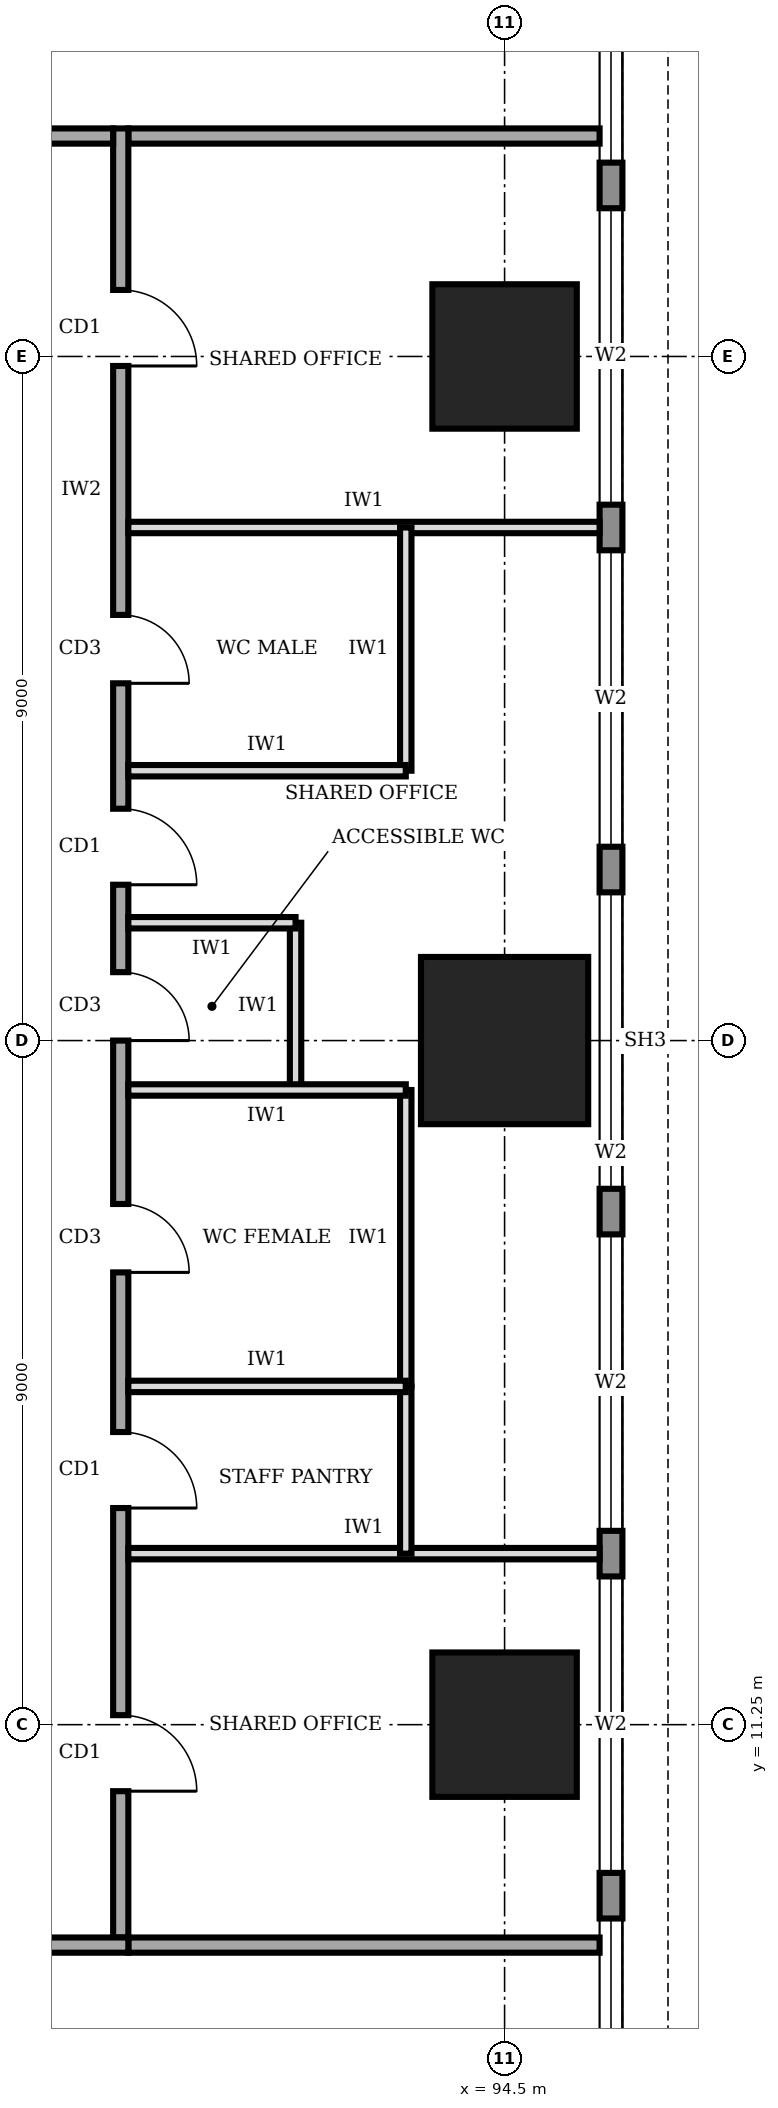
"""IFC4 building model, lengths in metres.
Left out: names, types, materials, properties, quantities, classifications, styles, units other than length and angle.
Written with IfcOpenShell. Run it as: python <this file> out.ifc"""

import sys

from ifc_helpers import new_model, si_unit, direction, frame, frame_2d, origin, origin_2d, place, context, subcontext, project, spatial, rectangle, extrude, element, fill, save


model = new_model("IFC4")
c1 = context("Model", 3, precision=1e-05, world=origin(), true_north=direction((0.0, 1.0)))
c2 = subcontext(c1, "Body", "Model", "MODEL_VIEW")
j1 = project(units=[si_unit("LENGTHUNIT", "METRE"), si_unit("PLANEANGLEUNIT", "RADIAN")], contexts=[c1])
p1 = place(None, origin())
s1 = spatial("IfcSite", under=j1, at=p1, CompositionType="ELEMENT")
p2 = place(p1, origin())
s2 = spatial("IfcBuilding", under=s1, at=p2, CompositionType="ELEMENT")
p3 = place(p2, frame((0.0, 0.0, 149.0)))
s3 = spatial("IfcBuildingStorey", under=s2, at=p3, CompositionType="ELEMENT", Elevation=149.0)
p4 = place(p3, frame((94.5, 11.25, 0.0), z_axis=(0.0, 0.0, 1.0), x_axis=(1.0, 0.0, 0.0)))
e1 = element("IfcColumn", 1, at=p4, inside=s3, PredefinedType="COLUMN", context=c2, shape_type="SweptSolid", body=[
    extrude(rectangle(XDim=1.9, YDim=1.9, at=origin_2d()), origin(), (0.0, 0.0, 1.0), 4.0),
])
p5 = place(p3, frame((94.5, 20.25, 0.0), z_axis=(0.0, 0.0, 1.0), x_axis=(1.0, 0.0, 0.0)))
e2 = element("IfcColumn", 2, at=p5, inside=s3, PredefinedType="COLUMN", context=c2, shape_type="SweptSolid", body=[
    extrude(rectangle(XDim=2.2, YDim=2.2, at=origin_2d()), origin(), (0.0, 0.0, 1.0), 4.0),
])
p6 = place(p3, frame((94.5, 29.25, 0.0), z_axis=(0.0, 0.0, 1.0), x_axis=(1.0, 0.0, 0.0)))
e3 = element("IfcColumn", 3, at=p6, inside=s3, PredefinedType="COLUMN", context=c2, shape_type="SweptSolid", body=[
    extrude(rectangle(XDim=1.9, YDim=1.9, at=origin_2d()), origin(), (0.0, 0.0, 1.0), 4.0),
])
p7 = place(p3, frame((95.9, 3.32, 0.0), z_axis=(0.0, 0.0, 1.0), x_axis=(0.0, 1.0, 0.0)))
e4 = element("IfcWall", 4, at=p7, inside=s3, PredefinedType="STANDARD", context=c2, shape_type="SweptSolid", body=[
    extrude(rectangle(XDim=33.86, YDim=0.3, at=frame_2d((16.93, 0.0))), origin(), (0.0, 0.0, 1.0), 3.75),
])
p8 = place(p7, frame((1.48, 0.0, 0.6)))
e5 = element("IfcOpeningElement", 5, at=p8, cuts=e4, PredefinedType="OPENING", context=c2, shape_type="SweptSolid", body=[
    extrude(rectangle(XDim=3.9, YDim=2.6, at=frame_2d((1.95, 1.3))), frame((0.0, 0.16, 0.0), z_axis=(0.0, -1.0, 0.0), x_axis=(1.0, 0.0, 0.0)), (0.0, 0.0, 1.0), 0.32),
])
p9 = place(p7, frame((5.98, 0.0, 0.6)))
e6 = element("IfcOpeningElement", 6, at=p9, cuts=e4, PredefinedType="OPENING", context=c2, shape_type="SweptSolid", body=[
    extrude(rectangle(XDim=3.9, YDim=2.6, at=frame_2d((1.95, 1.3))), frame((0.0, 0.16, 0.0), z_axis=(0.0, -1.0, 0.0), x_axis=(1.0, 0.0, 0.0)), (0.0, 0.0, 1.0), 0.32),
])
p10 = place(p7, frame((10.48, 0.0, 0.6)))
e7 = element("IfcOpeningElement", 7, at=p10, cuts=e4, PredefinedType="OPENING", context=c2, shape_type="SweptSolid", body=[
    extrude(rectangle(XDim=3.9, YDim=2.6, at=frame_2d((1.95, 1.3))), frame((0.0, 0.16, 0.0), z_axis=(0.0, -1.0, 0.0), x_axis=(1.0, 0.0, 0.0)), (0.0, 0.0, 1.0), 0.32),
])
p11 = place(p7, frame((14.98, 0.0, 0.6)))
e8 = element("IfcOpeningElement", 8, at=p11, cuts=e4, PredefinedType="OPENING", context=c2, shape_type="SweptSolid", body=[
    extrude(rectangle(XDim=3.9, YDim=2.6, at=frame_2d((1.95, 1.3))), frame((0.0, 0.16, 0.0), z_axis=(0.0, -1.0, 0.0), x_axis=(1.0, 0.0, 0.0)), (0.0, 0.0, 1.0), 0.32),
])
p12 = place(p7, frame((19.48, 0.0, 0.6)))
e9 = element("IfcOpeningElement", 9, at=p12, cuts=e4, PredefinedType="OPENING", context=c2, shape_type="SweptSolid", body=[
    extrude(rectangle(XDim=3.9, YDim=2.6, at=frame_2d((1.95, 1.3))), frame((0.0, 0.16, 0.0), z_axis=(0.0, -1.0, 0.0), x_axis=(1.0, 0.0, 0.0)), (0.0, 0.0, 1.0), 0.32),
])
p13 = place(p7, frame((23.98, 0.0, 0.6)))
e10 = element("IfcOpeningElement", 10, at=p13, cuts=e4, PredefinedType="OPENING", context=c2, shape_type="SweptSolid", body=[
    extrude(rectangle(XDim=3.9, YDim=2.6, at=frame_2d((1.95, 1.3))), frame((0.0, 0.16, 0.0), z_axis=(0.0, -1.0, 0.0), x_axis=(1.0, 0.0, 0.0)), (0.0, 0.0, 1.0), 0.32),
])
p14 = place(p7, frame((28.48, 0.0, 0.6)))
e11 = element("IfcOpeningElement", 11, at=p14, cuts=e4, PredefinedType="OPENING", context=c2, shape_type="SweptSolid", body=[
    extrude(rectangle(XDim=3.9, YDim=2.6, at=frame_2d((1.95, 1.3))), frame((0.0, 0.16, 0.0), z_axis=(0.0, -1.0, 0.0), x_axis=(1.0, 0.0, 0.0)), (0.0, 0.0, 1.0), 0.32),
])
p15 = place(p3, frame((63.3, 8.35, 0.0), z_axis=(0.0, 0.0, 1.0), x_axis=(1.0, 0.0, 0.0)))
e12 = element("IfcWall", 12, at=p15, inside=s3, PredefinedType="SOLIDWALL", context=c2, shape_type="SweptSolid", body=[
    extrude(rectangle(XDim=26.25, YDim=0.2, at=frame_2d((13.125, 0.0))), origin(), (0.0, 0.0, 1.0), 3.75),
])
p16 = place(p15, frame((6.0, 0.0, 0.0)))
e13 = element("IfcOpeningElement", 13, at=p16, cuts=e12, PredefinedType="OPENING", context=c2, shape_type="SweptSolid", body=[
    extrude(rectangle(XDim=1.0, YDim=2.1, at=frame_2d((0.5, 1.05))), frame((0.0, 0.11, 0.0), z_axis=(0.0, -1.0, 0.0), x_axis=(1.0, 0.0, 0.0)), (0.0, 0.0, 1.0), 0.22),
])
p17 = place(p15, frame((19.325, 0.0, 0.0)))
e14 = element("IfcOpeningElement", 14, at=p17, cuts=e12, PredefinedType="OPENING", context=c2, shape_type="SweptSolid", body=[
    extrude(rectangle(XDim=1.0, YDim=2.1, at=frame_2d((0.5, 1.05))), frame((0.0, 0.11, 0.0), z_axis=(0.0, -1.0, 0.0), x_axis=(1.0, 0.0, 0.0)), (0.0, 0.0, 1.0), 0.22),
])
p18 = place(p3, frame((89.45, 8.45, 0.0), z_axis=(0.0, 0.0, 1.0), x_axis=(0.0, 1.0, 0.0)))
e15 = element("IfcWall", 15, at=p18, inside=s3, PredefinedType="SOLIDWALL", context=c2, shape_type="SweptSolid", body=[
    extrude(rectangle(XDim=23.8, YDim=0.2, at=frame_2d((11.9, 0.0))), origin(), (0.0, 0.0, 1.0), 3.75),
])
p19 = place(p18, frame((1.925, 0.0, 0.0)))
e16 = element("IfcOpeningElement", 16, at=p19, cuts=e15, PredefinedType="OPENING", context=c2, shape_type="SweptSolid", body=[
    extrude(rectangle(XDim=1.0, YDim=2.1, at=frame_2d((0.5, 1.05))), frame((0.0, 0.11, 0.0), z_axis=(0.0, -1.0, 0.0), x_axis=(1.0, 0.0, 0.0)), (0.0, 0.0, 1.0), 0.22),
])
p20 = place(p18, frame((5.65, 0.0, 0.0)))
e17 = element("IfcOpeningElement", 17, at=p20, cuts=e15, PredefinedType="OPENING", context=c2, shape_type="SweptSolid", body=[
    extrude(rectangle(XDim=1.0, YDim=2.1, at=frame_2d((0.5, 1.05))), frame((0.0, 0.11, 0.0), z_axis=(0.0, -1.0, 0.0), x_axis=(1.0, 0.0, 0.0)), (0.0, 0.0, 1.0), 0.22),
])
p21 = place(p18, frame((8.75, 0.0, 0.0)))
e18 = element("IfcOpeningElement", 18, at=p21, cuts=e15, PredefinedType="OPENING", context=c2, shape_type="SweptSolid", body=[
    extrude(rectangle(XDim=0.9, YDim=2.1, at=frame_2d((0.45, 1.05))), frame((0.0, 0.11, 0.0), z_axis=(0.0, -1.0, 0.0), x_axis=(1.0, 0.0, 0.0)), (0.0, 0.0, 1.0), 0.22),
])
p22 = place(p18, frame((11.8, 0.0, 0.0)))
e19 = element("IfcOpeningElement", 19, at=p22, cuts=e15, PredefinedType="OPENING", context=c2, shape_type="SweptSolid", body=[
    extrude(rectangle(XDim=0.9, YDim=2.1, at=frame_2d((0.45, 1.05))), frame((0.0, 0.11, 0.0), z_axis=(0.0, -1.0, 0.0), x_axis=(1.0, 0.0, 0.0)), (0.0, 0.0, 1.0), 0.22),
])
p23 = place(p18, frame((16.5, 0.0, 0.0)))
e20 = element("IfcOpeningElement", 20, at=p23, cuts=e15, PredefinedType="OPENING", context=c2, shape_type="SweptSolid", body=[
    extrude(rectangle(XDim=0.9, YDim=2.1, at=frame_2d((0.45, 1.05))), frame((0.0, 0.11, 0.0), z_axis=(0.0, -1.0, 0.0), x_axis=(1.0, 0.0, 0.0)), (0.0, 0.0, 1.0), 0.22),
])
p24 = place(p18, frame((13.85, 0.0, 0.0)))
e21 = element("IfcOpeningElement", 21, at=p24, cuts=e15, PredefinedType="OPENING", context=c2, shape_type="SweptSolid", body=[
    extrude(rectangle(XDim=1.0, YDim=2.1, at=frame_2d((0.5, 1.05))), frame((0.0, 0.11, 0.0), z_axis=(0.0, -1.0, 0.0), x_axis=(1.0, 0.0, 0.0)), (0.0, 0.0, 1.0), 0.22),
])
p25 = place(p18, frame((20.675, 0.0, 0.0)))
e22 = element("IfcOpeningElement", 22, at=p25, cuts=e15, PredefinedType="OPENING", context=c2, shape_type="SweptSolid", body=[
    extrude(rectangle(XDim=1.0, YDim=2.1, at=frame_2d((0.5, 1.05))), frame((0.0, 0.11, 0.0), z_axis=(0.0, -1.0, 0.0), x_axis=(1.0, 0.0, 0.0)), (0.0, 0.0, 1.0), 0.22),
])
p26 = place(p3, frame((89.35, 32.15, 0.0), z_axis=(0.0, 0.0, 1.0), x_axis=(-1.0, 0.0, 0.0)))
e23 = element("IfcWall", 23, at=p26, inside=s3, PredefinedType="SOLIDWALL", context=c2, shape_type="SweptSolid", body=[
    extrude(rectangle(XDim=26.05, YDim=0.2, at=frame_2d((13.025, 0.0))), origin(), (0.0, 0.0, 1.0), 3.75),
])
p27 = place(p26, frame((16.4, 0.0, 0.0)))
e24 = element("IfcOpeningElement", 24, at=p27, cuts=e23, PredefinedType="OPENING", context=c2, shape_type="SweptSolid", body=[
    extrude(rectangle(XDim=1.8, YDim=2.1, at=frame_2d((0.9, 1.05))), frame((0.0, 0.11, 0.0), z_axis=(0.0, -1.0, 0.0), x_axis=(1.0, 0.0, 0.0)), (0.0, 0.0, 1.0), 0.22),
])
p28 = place(p26, frame((5.6, 0.0, 0.0)))
e25 = element("IfcOpeningElement", 25, at=p28, cuts=e23, PredefinedType="OPENING", context=c2, shape_type="SweptSolid", body=[
    extrude(rectangle(XDim=1.0, YDim=2.1, at=frame_2d((0.5, 1.05))), frame((0.0, 0.11, 0.0), z_axis=(0.0, -1.0, 0.0), x_axis=(1.0, 0.0, 0.0)), (0.0, 0.0, 1.0), 0.22),
])
p29 = place(p26, frame((1.325, 0.0, 0.0)))
e26 = element("IfcOpeningElement", 26, at=p29, cuts=e23, PredefinedType="OPENING", context=c2, shape_type="SweptSolid", body=[
    extrude(rectangle(XDim=1.0, YDim=2.1, at=frame_2d((0.5, 1.05))), frame((0.0, 0.11, 0.0), z_axis=(0.0, -1.0, 0.0), x_axis=(1.0, 0.0, 0.0)), (0.0, 0.0, 1.0), 0.22),
])
for number, where, z_axis, x_axis in (
    (27, (89.55, 8.35, 0.0), (0.0, 0.0, 1.0), (1.0, 0.0, 0.0)),
    (28, (89.55, 32.15, 0.0), (0.0, 0.0, 1.0), (1.0, 0.0, 0.0)),
):
    element("IfcWall", number, at=place(p3, frame(where, z_axis=z_axis, x_axis=x_axis)), inside=s3, PredefinedType="SOLIDWALL", context=c2, shape_type="SweptSolid", body=[
        extrude(rectangle(XDim=6.2, YDim=0.2, at=frame_2d((3.1, 0.0))), origin(), (0.0, 0.0, 1.0), 3.75),
    ])
for number, where, z_axis, x_axis in (
    (29, (89.55, 13.5, 0.0), (0.0, 0.0, 1.0), (1.0, 0.0, 0.0)),
    (30, (89.55, 27.0, 0.0), (0.0, 0.0, 1.0), (1.0, 0.0, 0.0)),
):
    element("IfcWall", number, at=place(p3, frame(where, z_axis=z_axis, x_axis=x_axis)), inside=s3, PredefinedType="PARTITIONING", context=c2, shape_type="SweptSolid", body=[
        extrude(rectangle(XDim=6.2, YDim=0.15, at=frame_2d((3.1, 0.0))), origin(), (0.0, 0.0, 1.0), 3.75),
    ])
p30 = place(p3, frame((89.55, 15.7, 0.0), z_axis=(0.0, 0.0, 1.0), x_axis=(1.0, 0.0, 0.0)))
e31 = element("IfcWall", 31, at=p30, inside=s3, PredefinedType="PARTITIONING", context=c2, shape_type="SweptSolid", body=[
    extrude(rectangle(XDim=3.65, YDim=0.15, at=frame_2d((1.825, 0.0))), origin(), (0.0, 0.0, 1.0), 3.75),
])
p31 = place(p3, frame((89.55, 19.6, 0.0), z_axis=(0.0, 0.0, 1.0), x_axis=(1.0, 0.0, 0.0)))
e32 = element("IfcWall", 32, at=p31, inside=s3, PredefinedType="PARTITIONING", context=c2, shape_type="SweptSolid", body=[
    extrude(rectangle(XDim=3.65, YDim=0.15, at=frame_2d((1.825, 0.0))), origin(), (0.0, 0.0, 1.0), 2.85),
])
p32 = place(p3, frame((89.55, 21.8, 0.0), z_axis=(0.0, 0.0, 1.0), x_axis=(1.0, 0.0, 0.0)))
e33 = element("IfcWall", 33, at=p32, inside=s3, PredefinedType="PARTITIONING", context=c2, shape_type="SweptSolid", body=[
    extrude(rectangle(XDim=2.2, YDim=0.15, at=frame_2d((1.1, 0.0))), origin(), (0.0, 0.0, 1.0), 3.75),
])
p33 = place(p3, frame((89.55, 23.8, 0.0), z_axis=(0.0, 0.0, 1.0), x_axis=(1.0, 0.0, 0.0)))
e34 = element("IfcWall", 34, at=p33, inside=s3, PredefinedType="PARTITIONING", context=c2, shape_type="SweptSolid", body=[
    extrude(rectangle(XDim=3.65, YDim=0.15, at=frame_2d((1.825, 0.0))), origin(), (0.0, 0.0, 1.0), 3.75),
])
p34 = place(p3, frame((93.2, 13.5, 0.0), z_axis=(0.0, 0.0, 1.0), x_axis=(0.0, 1.0, 0.0)))
e35 = element("IfcWall", 35, at=p34, inside=s3, PredefinedType="PARTITIONING", context=c2, shape_type="SweptSolid", body=[
    extrude(rectangle(XDim=2.2, YDim=0.15, at=frame_2d((1.1, 0.0))), origin(), (0.0, 0.0, 1.0), 3.75),
])
p35 = place(p3, frame((93.2, 15.7, 0.0), z_axis=(0.0, 0.0, 1.0), x_axis=(0.0, 1.0, 0.0)))
e36 = element("IfcWall", 36, at=p35, inside=s3, PredefinedType="PARTITIONING", context=c2, shape_type="SweptSolid", body=[
    extrude(rectangle(XDim=3.9, YDim=0.15, at=frame_2d((1.95, 0.0))), origin(), (0.0, 0.0, 1.0), 3.75),
])
p36 = place(p3, frame((91.75, 19.6, 0.0), z_axis=(0.0, 0.0, 1.0), x_axis=(0.0, 1.0, 0.0)))
e37 = element("IfcWall", 37, at=p36, inside=s3, PredefinedType="PARTITIONING", context=c2, shape_type="SweptSolid", body=[
    extrude(rectangle(XDim=2.2, YDim=0.15, at=frame_2d((1.1, 0.0))), origin(), (0.0, 0.0, 1.0), 3.75),
])
p37 = place(p3, frame((93.2, 23.8, 0.0), z_axis=(0.0, 0.0, 1.0), x_axis=(0.0, 1.0, 0.0)))
e38 = element("IfcWall", 38, at=p37, inside=s3, PredefinedType="PARTITIONING", context=c2, shape_type="SweptSolid", body=[
    extrude(rectangle(XDim=3.2, YDim=0.15, at=frame_2d((1.6, 0.0))), origin(), (0.0, 0.0, 1.0), 3.75),
])
p38 = place(p8, origin())
e39 = element("IfcWindow", 39, at=p38, inside=s3, PartitioningType="SINGLE_PANEL", PredefinedType="WINDOW", context=c2, shape_type="SweptSolid", body=[
    extrude(rectangle(XDim=3.9, YDim=2.6, at=frame_2d((1.95, 1.3))), frame((0.0, 0.03, 0.0), z_axis=(0.0, -1.0, 0.0), x_axis=(1.0, 0.0, 0.0)), (0.0, 0.0, 1.0), 0.06),
])
fill(e5, e39)
p39 = place(p9, origin())
e40 = element("IfcWindow", 40, at=p39, inside=s3, PartitioningType="SINGLE_PANEL", PredefinedType="WINDOW", context=c2, shape_type="SweptSolid", body=[
    extrude(rectangle(XDim=3.9, YDim=2.6, at=frame_2d((1.95, 1.3))), frame((0.0, 0.03, 0.0), z_axis=(0.0, -1.0, 0.0), x_axis=(1.0, 0.0, 0.0)), (0.0, 0.0, 1.0), 0.06),
])
fill(e6, e40)
p40 = place(p10, origin())
e41 = element("IfcWindow", 41, at=p40, inside=s3, PartitioningType="SINGLE_PANEL", PredefinedType="WINDOW", context=c2, shape_type="SweptSolid", body=[
    extrude(rectangle(XDim=3.9, YDim=2.6, at=frame_2d((1.95, 1.3))), frame((0.0, 0.03, 0.0), z_axis=(0.0, -1.0, 0.0), x_axis=(1.0, 0.0, 0.0)), (0.0, 0.0, 1.0), 0.06),
])
fill(e7, e41)
p41 = place(p11, origin())
e42 = element("IfcWindow", 42, at=p41, inside=s3, PartitioningType="SINGLE_PANEL", PredefinedType="WINDOW", context=c2, shape_type="SweptSolid", body=[
    extrude(rectangle(XDim=3.9, YDim=2.6, at=frame_2d((1.95, 1.3))), frame((0.0, 0.03, 0.0), z_axis=(0.0, -1.0, 0.0), x_axis=(1.0, 0.0, 0.0)), (0.0, 0.0, 1.0), 0.06),
])
fill(e8, e42)
p42 = place(p12, origin())
e43 = element("IfcWindow", 43, at=p42, inside=s3, PartitioningType="SINGLE_PANEL", PredefinedType="WINDOW", context=c2, shape_type="SweptSolid", body=[
    extrude(rectangle(XDim=3.9, YDim=2.6, at=frame_2d((1.95, 1.3))), frame((0.0, 0.03, 0.0), z_axis=(0.0, -1.0, 0.0), x_axis=(1.0, 0.0, 0.0)), (0.0, 0.0, 1.0), 0.06),
])
fill(e9, e43)
p43 = place(p13, origin())
e44 = element("IfcWindow", 44, at=p43, inside=s3, PartitioningType="SINGLE_PANEL", PredefinedType="WINDOW", context=c2, shape_type="SweptSolid", body=[
    extrude(rectangle(XDim=3.9, YDim=2.6, at=frame_2d((1.95, 1.3))), frame((0.0, 0.03, 0.0), z_axis=(0.0, -1.0, 0.0), x_axis=(1.0, 0.0, 0.0)), (0.0, 0.0, 1.0), 0.06),
])
fill(e10, e44)
p44 = place(p14, origin())
e45 = element("IfcWindow", 45, at=p44, inside=s3, PartitioningType="SINGLE_PANEL", PredefinedType="WINDOW", context=c2, shape_type="SweptSolid", body=[
    extrude(rectangle(XDim=3.9, YDim=2.6, at=frame_2d((1.95, 1.3))), frame((0.0, 0.03, 0.0), z_axis=(0.0, -1.0, 0.0), x_axis=(1.0, 0.0, 0.0)), (0.0, 0.0, 1.0), 0.06),
])
fill(e11, e45)
p45 = place(p19, frame((1.0, 0.0, 0.0), z_axis=(0.0, 0.0, 1.0), x_axis=(-1.0, 0.0, 0.0)))
e46 = element("IfcDoor", 46, at=p45, inside=s3, OperationType="SINGLE_SWING_RIGHT", PredefinedType="DOOR", context=c2, shape_type="SweptSolid", body=[
    extrude(rectangle(XDim=1.0, YDim=2.1, at=frame_2d((0.5, 1.05))), frame((0.0, 0.025, 0.0), z_axis=(0.0, -1.0, 0.0), x_axis=(1.0, 0.0, 0.0)), (0.0, 0.0, 1.0), 0.05),
])
fill(e16, e46)
p46 = place(p20, frame((1.0, 0.0, 0.0), z_axis=(0.0, 0.0, 1.0), x_axis=(-1.0, 0.0, 0.0)))
e47 = element("IfcDoor", 47, at=p46, inside=s3, OperationType="SINGLE_SWING_RIGHT", PredefinedType="DOOR", context=c2, shape_type="SweptSolid", body=[
    extrude(rectangle(XDim=1.0, YDim=2.1, at=frame_2d((0.5, 1.05))), frame((0.0, 0.025, 0.0), z_axis=(0.0, -1.0, 0.0), x_axis=(1.0, 0.0, 0.0)), (0.0, 0.0, 1.0), 0.05),
])
fill(e17, e47)
p47 = place(p21, frame((0.9, 0.0, 0.0), z_axis=(0.0, 0.0, 1.0), x_axis=(-1.0, 0.0, 0.0)))
e48 = element("IfcDoor", 48, at=p47, inside=s3, OperationType="SINGLE_SWING_RIGHT", PredefinedType="DOOR", context=c2, shape_type="SweptSolid", body=[
    extrude(rectangle(XDim=0.9, YDim=2.1, at=frame_2d((0.45, 1.05))), frame((0.0, 0.025, 0.0), z_axis=(0.0, -1.0, 0.0), x_axis=(1.0, 0.0, 0.0)), (0.0, 0.0, 1.0), 0.05),
])
fill(e18, e48)
p48 = place(p22, frame((0.9, 0.0, 0.0), z_axis=(0.0, 0.0, 1.0), x_axis=(-1.0, 0.0, 0.0)))
e49 = element("IfcDoor", 49, at=p48, inside=s3, OperationType="SINGLE_SWING_RIGHT", PredefinedType="DOOR", context=c2, shape_type="SweptSolid", body=[
    extrude(rectangle(XDim=0.9, YDim=2.1, at=frame_2d((0.45, 1.05))), frame((0.0, 0.025, 0.0), z_axis=(0.0, -1.0, 0.0), x_axis=(1.0, 0.0, 0.0)), (0.0, 0.0, 1.0), 0.05),
])
fill(e19, e49)
p49 = place(p23, frame((0.9, 0.0, 0.0), z_axis=(0.0, 0.0, 1.0), x_axis=(-1.0, 0.0, 0.0)))
e50 = element("IfcDoor", 50, at=p49, inside=s3, OperationType="SINGLE_SWING_RIGHT", PredefinedType="DOOR", context=c2, shape_type="SweptSolid", body=[
    extrude(rectangle(XDim=0.9, YDim=2.1, at=frame_2d((0.45, 1.05))), frame((0.0, 0.025, 0.0), z_axis=(0.0, -1.0, 0.0), x_axis=(1.0, 0.0, 0.0)), (0.0, 0.0, 1.0), 0.05),
])
fill(e20, e50)
p50 = place(p24, frame((1.0, 0.0, 0.0), z_axis=(0.0, 0.0, 1.0), x_axis=(-1.0, 0.0, 0.0)))
e51 = element("IfcDoor", 51, at=p50, inside=s3, OperationType="SINGLE_SWING_RIGHT", PredefinedType="DOOR", context=c2, shape_type="SweptSolid", body=[
    extrude(rectangle(XDim=1.0, YDim=2.1, at=frame_2d((0.5, 1.05))), frame((0.0, 0.025, 0.0), z_axis=(0.0, -1.0, 0.0), x_axis=(1.0, 0.0, 0.0)), (0.0, 0.0, 1.0), 0.05),
])
fill(e21, e51)
p51 = place(p25, frame((1.0, 0.0, 0.0), z_axis=(0.0, 0.0, 1.0), x_axis=(-1.0, 0.0, 0.0)))
e52 = element("IfcDoor", 52, at=p51, inside=s3, OperationType="SINGLE_SWING_RIGHT", PredefinedType="DOOR", context=c2, shape_type="SweptSolid", body=[
    extrude(rectangle(XDim=1.0, YDim=2.1, at=frame_2d((0.5, 1.05))), frame((0.0, 0.025, 0.0), z_axis=(0.0, -1.0, 0.0), x_axis=(1.0, 0.0, 0.0)), (0.0, 0.0, 1.0), 0.05),
])
fill(e22, e52)
save(model, sys.argv[1])
